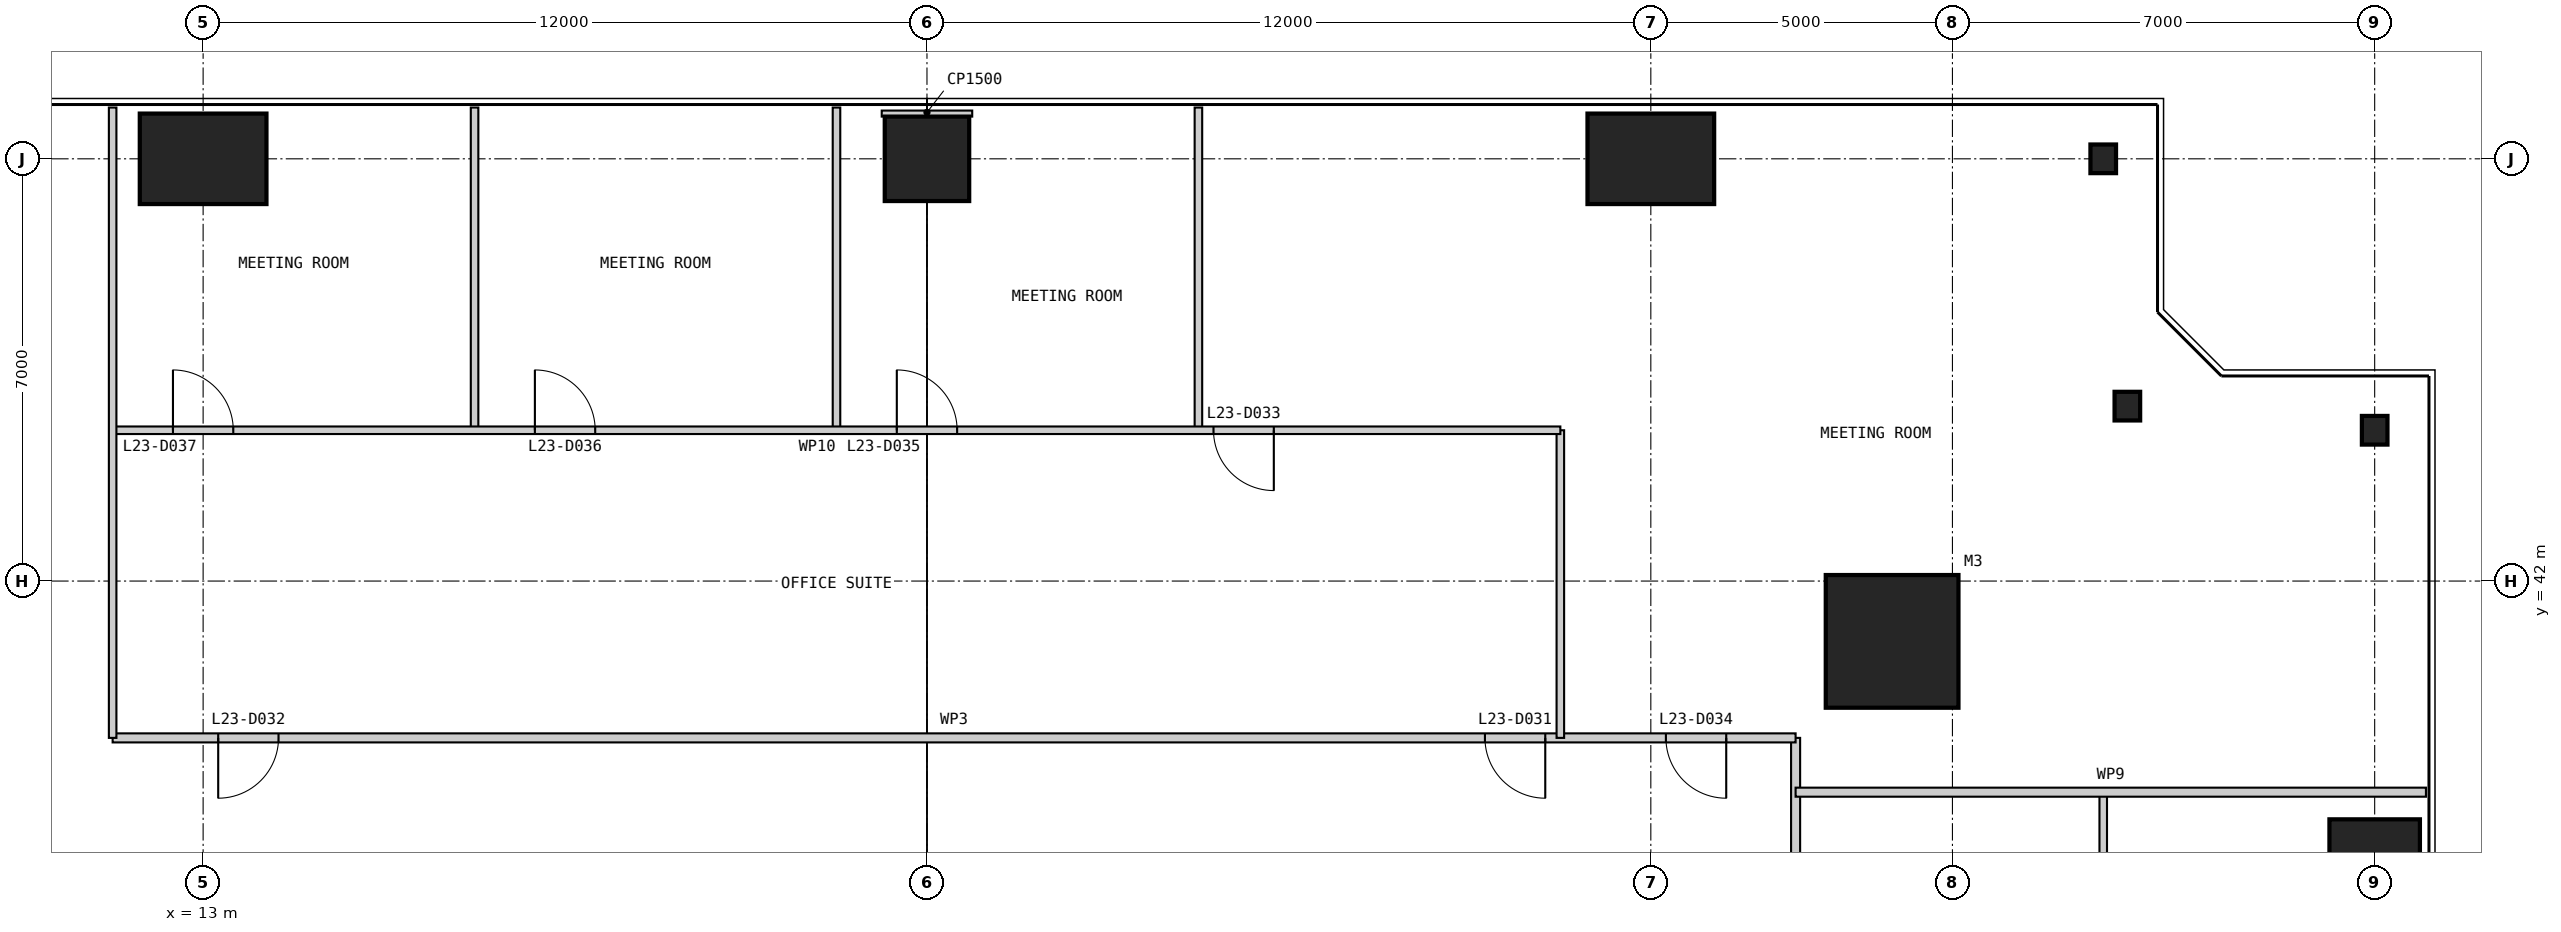
"""IFC4 building model, lengths in metres.
Left out: names, types, materials, properties, quantities, classifications, styles, units other than length and angle.
Written with IfcOpenShell. Run it as: python <this file> out.ifc"""

import sys

from ifc_helpers import new_model, si_unit, direction, frame, frame_2d, origin, origin_2d, place, context, subcontext, project, spatial, rectangle, i_section, extrude, element, fill, save


model = new_model("IFC4")
c1 = context("Model", 3, precision=1e-05, world=origin(), true_north=direction((0.0, 1.0)))
c2 = subcontext(c1, "Body", "Model", "MODEL_VIEW")
j1 = project(units=[si_unit("LENGTHUNIT", "METRE"), si_unit("PLANEANGLEUNIT", "RADIAN")], contexts=[c1])
p1 = place(None, origin())
s1 = spatial("IfcSite", under=j1, at=p1, CompositionType="ELEMENT")
p2 = place(p1, origin())
s2 = spatial("IfcBuilding", under=s1, at=p2, CompositionType="ELEMENT")
p3 = place(p2, frame((0.0, 0.0, 102.4)))
s3 = spatial("IfcBuildingStorey", under=s2, at=p3, CompositionType="ELEMENT", Elevation=102.4)
p4 = place(p3, frame((41.0, 41.0, 0.0), z_axis=(0.0, 0.0, 1.0), x_axis=(1.0, 0.0, 0.0)))
e1 = element("IfcColumn", 1, at=p4, inside=s3, PredefinedType="COLUMN", context=c2, shape_type="SweptSolid", body=[
    extrude(rectangle(XDim=2.2, YDim=2.2, at=origin_2d()), origin(), (0.0, 0.0, 1.0), 4.0),
])
p5 = place(p3, frame((49.0, 37.0, 0.0), z_axis=(0.0, 0.0, 1.0), x_axis=(1.0, 0.0, 0.0)))
e2 = element("IfcColumn", 2, at=p5, inside=s3, PredefinedType="COLUMN", context=c2, shape_type="SweptSolid", body=[
    extrude(rectangle(XDim=1.5, YDim=2.1, at=origin_2d()), origin(), (0.0, 0.0, 1.0), 4.0),
])
for number, where, z_axis, x_axis in (
    (3, (49.0, 44.5, 0.0), (0.0, 0.0, 1.0), (1.0, 0.0, 0.0)),
    (4, (44.9, 44.9, 0.0), (0.0, 0.0, 1.0), (1.0, 0.0, 0.0)),
    (5, (44.5, 49.0, 0.0), (0.0, 0.0, 1.0), (1.0, 0.0, 0.0)),
):
    element("IfcColumn", number, at=place(p3, frame(where, z_axis=z_axis, x_axis=x_axis)), inside=s3, PredefinedType="COLUMN", context=c2, shape_type="SweptSolid", body=[
        extrude(i_section(OverallWidth=0.424, OverallDepth=0.475, WebThickness=0.048, FlangeThickness=0.077, at=origin_2d()), origin(), (0.0, 0.0, 1.0), 4.0),
    ])
p6 = place(p3, frame((37.0, 49.0, 0.0), z_axis=(0.0, 0.0, 1.0), x_axis=(1.0, 0.0, 0.0)))
e6 = element("IfcColumn", 6, at=p6, inside=s3, PredefinedType="COLUMN", context=c2, shape_type="SweptSolid", body=[
    extrude(rectangle(XDim=2.1, YDim=1.5, at=origin_2d()), origin(), (0.0, 0.0, 1.0), 4.0),
])
p7 = place(p3, frame((25.0, 49.0, 0.0), z_axis=(0.0, 0.0, 1.0), x_axis=(1.0, 0.0, 0.0)))
e7 = element("IfcColumn", 7, at=p7, inside=s3, PredefinedType="COLUMN", context=c2, shape_type="SweptSolid", body=[
    extrude(rectangle(XDim=1.4, YDim=1.4, at=origin_2d()), origin(), (0.0, 0.0, 1.0), 4.0),
])
p8 = place(p3, frame((13.0, 49.0, 0.0), z_axis=(0.0, 0.0, 1.0), x_axis=(1.0, 0.0, 0.0)))
e8 = element("IfcColumn", 8, at=p8, inside=s3, PredefinedType="COLUMN", context=c2, shape_type="SweptSolid", body=[
    extrude(rectangle(XDim=2.1, YDim=1.5, at=origin_2d()), origin(), (0.0, 0.0, 1.0), 4.0),
])
p9 = place(p3, frame((39.4, 10.6, 0.0), z_axis=(0.0, 0.0, 1.0), x_axis=(0.0, 1.0, 0.0)))
e9 = element("IfcWall", 9, at=p9, inside=s3, PredefinedType="PARTITIONING", context=c2, shape_type="SweptSolid", body=[
    extrude(rectangle(XDim=28.8, YDim=0.15, at=frame_2d((14.4, 0.0))), origin(), (0.0, 0.0, 1.0), 3.85),
])
p10 = place(p9, frame((12.4, 0.0, 0.0)))
e10 = element("IfcOpeningElement", 10, at=p10, cuts=e9, PredefinedType="OPENING", context=c2, shape_type="SweptSolid", body=[
    extrude(rectangle(XDim=1.0, YDim=2.2, at=frame_2d((0.5, 1.1))), frame((0.0, 0.085, 0.0), z_axis=(0.0, -1.0, 0.0), x_axis=(1.0, 0.0, 0.0)), (0.0, 0.0, 1.0), 0.17),
])
p11 = place(p3, frame((44.5, 14.5, 0.0), z_axis=(0.0, 0.0, 1.0), x_axis=(0.0, 1.0, 0.0)))
e11 = element("IfcWall", 11, at=p11, inside=s3, PredefinedType="PARTITIONING", context=c2, shape_type="SweptSolid", body=[
    extrude(rectangle(XDim=24.0, YDim=0.125, at=frame_2d((12.0, 0.0))), origin(), (0.0, 0.0, 1.0), 3.85),
])
p12 = place(p11, frame((10.05, 0.0, 0.0)))
e12 = element("IfcOpeningElement", 12, at=p12, cuts=e11, PredefinedType="OPENING", context=c2, shape_type="SweptSolid", body=[
    extrude(rectangle(XDim=0.9, YDim=2.2, at=frame_2d((0.45, 1.1))), frame((0.0, 0.073, 0.0), z_axis=(0.0, -1.0, 0.0), x_axis=(1.0, 0.0, 0.0)), (0.0, 0.0, 1.0), 0.145),
])
p13 = place(p11, frame((16.05, 0.0, 0.0)))
e13 = element("IfcOpeningElement", 13, at=p13, cuts=e11, PredefinedType="OPENING", context=c2, shape_type="SweptSolid", body=[
    extrude(rectangle(XDim=0.9, YDim=2.2, at=frame_2d((0.45, 1.1))), frame((0.0, 0.073, 0.0), z_axis=(0.0, -1.0, 0.0), x_axis=(1.0, 0.0, 0.0)), (0.0, 0.0, 1.0), 0.145),
])
p14 = place(p11, frame((19.0, 0.0, 0.0)))
e14 = element("IfcOpeningElement", 14, at=p14, cuts=e11, PredefinedType="OPENING", context=c2, shape_type="SweptSolid", body=[
    extrude(rectangle(XDim=1.0, YDim=2.2, at=frame_2d((0.5, 1.1))), frame((0.0, 0.073, 0.0), z_axis=(0.0, -1.0, 0.0), x_axis=(1.0, 0.0, 0.0)), (0.0, 0.0, 1.0), 0.145),
])
p15 = place(p3, frame((39.4, 39.4, 0.0), z_axis=(0.0, 0.0, 1.0), x_axis=(-1.0, 0.0, 0.0)))
e15 = element("IfcWall", 15, at=p15, inside=s3, PredefinedType="PARTITIONING", context=c2, shape_type="SweptSolid", body=[
    extrude(rectangle(XDim=27.9, YDim=0.15, at=frame_2d((13.95, 0.0))), origin(), (0.0, 0.0, 1.0), 3.85),
])
p16 = place(p15, frame((4.15, 0.0, 0.0)))
e16 = element("IfcOpeningElement", 16, at=p16, cuts=e15, PredefinedType="OPENING", context=c2, shape_type="SweptSolid", body=[
    extrude(rectangle(XDim=1.0, YDim=2.2, at=frame_2d((0.5, 1.1))), frame((0.0, 0.085, 0.0), z_axis=(0.0, -1.0, 0.0), x_axis=(1.0, 0.0, 0.0)), (0.0, 0.0, 1.0), 0.17),
])
p17 = place(p15, frame((25.15, 0.0, 0.0)))
e17 = element("IfcOpeningElement", 17, at=p17, cuts=e15, PredefinedType="OPENING", context=c2, shape_type="SweptSolid", body=[
    extrude(rectangle(XDim=1.0, YDim=2.2, at=frame_2d((0.5, 1.1))), frame((0.0, 0.085, 0.0), z_axis=(0.0, -1.0, 0.0), x_axis=(1.0, 0.0, 0.0)), (0.0, 0.0, 1.0), 0.17),
])
p18 = place(p15, frame((1.15, 0.0, 0.0)))
e18 = element("IfcOpeningElement", 18, at=p18, cuts=e15, PredefinedType="OPENING", context=c2, shape_type="SweptSolid", body=[
    extrude(rectangle(XDim=1.0, YDim=2.2, at=frame_2d((0.5, 1.1))), frame((0.0, 0.085, 0.0), z_axis=(0.0, -1.0, 0.0), x_axis=(1.0, 0.0, 0.0)), (0.0, 0.0, 1.0), 0.17),
])
p19 = place(p3, frame((49.85, 38.5, 0.0), z_axis=(0.0, 0.0, 1.0), x_axis=(-1.0, 0.0, 0.0)))
e19 = element("IfcWall", 19, at=p19, inside=s3, PredefinedType="PARTITIONING", context=c2, shape_type="SweptSolid", body=[
    extrude(rectangle(XDim=10.45, YDim=0.15, at=frame_2d((5.225, 0.0))), origin(), (0.0, 0.0, 1.0), 3.85),
])
p20 = place(p3, frame((35.5, 44.5, 0.0), z_axis=(0.0, 0.0, 1.0), x_axis=(0.0, -1.0, 0.0)))
e20 = element("IfcWall", 20, at=p20, inside=s3, PredefinedType="PARTITIONING", context=c2, shape_type="SweptSolid", body=[
    extrude(rectangle(XDim=5.1, YDim=0.125, at=frame_2d((2.55, 0.0))), origin(), (0.0, 0.0, 1.0), 3.85),
])
for number, where, z_axis, x_axis in (
    (21, (29.5, 49.85, 0.0), (0.0, 0.0, 1.0), (0.0, -1.0, 0.0)),
    (22, (23.5, 49.85, 0.0), (0.0, 0.0, 1.0), (0.0, -1.0, 0.0)),
    (23, (17.5, 49.85, 0.0), (0.0, 0.0, 1.0), (0.0, -1.0, 0.0)),
):
    element("IfcWall", number, at=place(p3, frame(where, z_axis=z_axis, x_axis=x_axis)), inside=s3, PredefinedType="PARTITIONING", context=c2, shape_type="SweptSolid", body=[
        extrude(rectangle(XDim=5.35, YDim=0.125, at=frame_2d((2.675, 0.0))), origin(), (0.0, 0.0, 1.0), 3.85),
    ])
p21 = place(p3, frame((35.5, 44.5, 0.0), z_axis=(0.0, 0.0, 1.0), x_axis=(-1.0, 0.0, 0.0)))
e24 = element("IfcWall", 24, at=p21, inside=s3, PredefinedType="PARTITIONING", context=c2, shape_type="SweptSolid", body=[
    extrude(rectangle(XDim=24.0, YDim=0.125, at=frame_2d((12.0, 0.0))), origin(), (0.0, 0.0, 1.0), 3.85),
])
p22 = place(p21, frame((4.75, 0.0, 0.0)))
e25 = element("IfcOpeningElement", 25, at=p22, cuts=e24, PredefinedType="OPENING", context=c2, shape_type="SweptSolid", body=[
    extrude(rectangle(XDim=1.0, YDim=2.2, at=frame_2d((0.5, 1.1))), frame((0.0, 0.073, 0.0), z_axis=(0.0, -1.0, 0.0), x_axis=(1.0, 0.0, 0.0)), (0.0, 0.0, 1.0), 0.145),
])
p23 = place(p21, frame((10.0, 0.0, 0.0)))
e26 = element("IfcOpeningElement", 26, at=p23, cuts=e24, PredefinedType="OPENING", context=c2, shape_type="SweptSolid", body=[
    extrude(rectangle(XDim=1.0, YDim=2.2, at=frame_2d((0.5, 1.1))), frame((0.0, 0.073, 0.0), z_axis=(0.0, -1.0, 0.0), x_axis=(1.0, 0.0, 0.0)), (0.0, 0.0, 1.0), 0.145),
])
p24 = place(p21, frame((16.0, 0.0, 0.0)))
e27 = element("IfcOpeningElement", 27, at=p24, cuts=e24, PredefinedType="OPENING", context=c2, shape_type="SweptSolid", body=[
    extrude(rectangle(XDim=1.0, YDim=2.2, at=frame_2d((0.5, 1.1))), frame((0.0, 0.073, 0.0), z_axis=(0.0, -1.0, 0.0), x_axis=(1.0, 0.0, 0.0)), (0.0, 0.0, 1.0), 0.145),
])
p25 = place(p21, frame((22.0, 0.0, 0.0)))
e28 = element("IfcOpeningElement", 28, at=p25, cuts=e24, PredefinedType="OPENING", context=c2, shape_type="SweptSolid", body=[
    extrude(rectangle(XDim=1.0, YDim=2.2, at=frame_2d((0.5, 1.1))), frame((0.0, 0.073, 0.0), z_axis=(0.0, -1.0, 0.0), x_axis=(1.0, 0.0, 0.0)), (0.0, 0.0, 1.0), 0.145),
])
p26 = place(p3, frame((11.5, 49.85, 0.0), z_axis=(0.0, 0.0, 1.0), x_axis=(0.0, -1.0, 0.0)))
e29 = element("IfcWall", 29, at=p26, inside=s3, PredefinedType="PARTITIONING", context=c2, shape_type="SweptSolid", body=[
    extrude(rectangle(XDim=10.45, YDim=0.125, at=frame_2d((5.225, 0.0))), origin(), (0.0, 0.0, 1.0), 3.85),
])
p27 = place(p3, frame((25.0, 49.8, 0.0), z_axis=(0.0, 0.0, 1.0), x_axis=(0.0, -1.0, 0.0)))
e30 = element("IfcWall", 30, at=p27, inside=s3, PredefinedType="PARTITIONING", context=c2, shape_type="SweptSolid", body=[
    extrude(rectangle(XDim=0.1, YDim=1.5, at=frame_2d((0.05, 0.0))), origin(), (0.0, 0.0, 1.0), 3.85),
])
p28 = place(p16, origin())
e31 = element("IfcDoor", 31, at=p28, inside=s3, OperationType="SINGLE_SWING_LEFT", PredefinedType="DOOR", context=c2, shape_type="SweptSolid", body=[
    extrude(rectangle(XDim=1.0, YDim=2.2, at=frame_2d((0.5, 1.1))), frame((0.0, 0.025, 0.0), z_axis=(0.0, -1.0, 0.0), x_axis=(1.0, 0.0, 0.0)), (0.0, 0.0, 1.0), 0.05),
])
fill(e16, e31)
p29 = place(p17, origin())
e32 = element("IfcDoor", 32, at=p29, inside=s3, OperationType="SINGLE_SWING_RIGHT", PredefinedType="DOOR", context=c2, shape_type="SweptSolid", body=[
    extrude(rectangle(XDim=1.0, YDim=2.2, at=frame_2d((0.5, 1.1))), frame((0.0, 0.025, 0.0), z_axis=(0.0, -1.0, 0.0), x_axis=(1.0, 0.0, 0.0)), (0.0, 0.0, 1.0), 0.05),
])
fill(e17, e32)
p30 = place(p22, origin())
e33 = element("IfcDoor", 33, at=p30, inside=s3, OperationType="SINGLE_SWING_LEFT", PredefinedType="DOOR", context=c2, shape_type="SweptSolid", body=[
    extrude(rectangle(XDim=1.0, YDim=2.2, at=frame_2d((0.5, 1.1))), frame((0.0, 0.025, 0.0), z_axis=(0.0, -1.0, 0.0), x_axis=(1.0, 0.0, 0.0)), (0.0, 0.0, 1.0), 0.05),
])
fill(e25, e33)
p31 = place(p18, origin())
e34 = element("IfcDoor", 34, at=p31, inside=s3, OperationType="SINGLE_SWING_LEFT", PredefinedType="DOOR", context=c2, shape_type="SweptSolid", body=[
    extrude(rectangle(XDim=1.0, YDim=2.2, at=frame_2d((0.5, 1.1))), frame((0.0, 0.025, 0.0), z_axis=(0.0, -1.0, 0.0), x_axis=(1.0, 0.0, 0.0)), (0.0, 0.0, 1.0), 0.05),
])
fill(e18, e34)
p32 = place(p23, frame((1.0, 0.0, 0.0), z_axis=(0.0, 0.0, 1.0), x_axis=(-1.0, 0.0, 0.0)))
e35 = element("IfcDoor", 35, at=p32, inside=s3, OperationType="SINGLE_SWING_LEFT", PredefinedType="DOOR", context=c2, shape_type="SweptSolid", body=[
    extrude(rectangle(XDim=1.0, YDim=2.2, at=frame_2d((0.5, 1.1))), frame((0.0, 0.025, 0.0), z_axis=(0.0, -1.0, 0.0), x_axis=(1.0, 0.0, 0.0)), (0.0, 0.0, 1.0), 0.05),
])
fill(e26, e35)
p33 = place(p24, frame((1.0, 0.0, 0.0), z_axis=(0.0, 0.0, 1.0), x_axis=(-1.0, 0.0, 0.0)))
e36 = element("IfcDoor", 36, at=p33, inside=s3, OperationType="SINGLE_SWING_LEFT", PredefinedType="DOOR", context=c2, shape_type="SweptSolid", body=[
    extrude(rectangle(XDim=1.0, YDim=2.2, at=frame_2d((0.5, 1.1))), frame((0.0, 0.025, 0.0), z_axis=(0.0, -1.0, 0.0), x_axis=(1.0, 0.0, 0.0)), (0.0, 0.0, 1.0), 0.05),
])
fill(e27, e36)
p34 = place(p25, frame((1.0, 0.0, 0.0), z_axis=(0.0, 0.0, 1.0), x_axis=(-1.0, 0.0, 0.0)))
e37 = element("IfcDoor", 37, at=p34, inside=s3, OperationType="SINGLE_SWING_LEFT", PredefinedType="DOOR", context=c2, shape_type="SweptSolid", body=[
    extrude(rectangle(XDim=1.0, YDim=2.2, at=frame_2d((0.5, 1.1))), frame((0.0, 0.025, 0.0), z_axis=(0.0, -1.0, 0.0), x_axis=(1.0, 0.0, 0.0)), (0.0, 0.0, 1.0), 0.05),
])
fill(e28, e37)
save(model, sys.argv[1])
